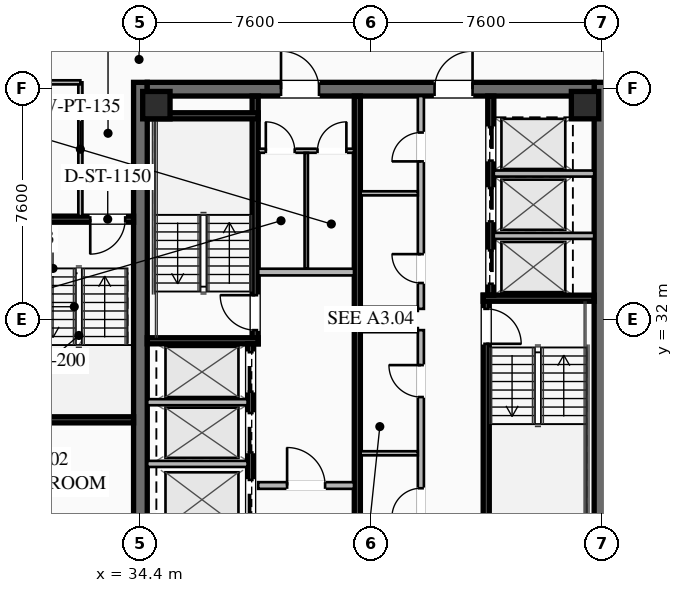
"""IFC4 building model, lengths in metres.
Left out: names, types, materials, properties, quantities, classifications, styles, units other than length and angle.
Written with IfcOpenShell. Run it as: python <this file> out.ifc"""

import sys

from ifc_helpers import new_model, si_unit, direction, frame, frame_2d, origin, origin_2d, place, context, subcontext, project, spatial, rectangle, hollow_rectangle, extrude, element, fill, save


model = new_model("IFC4")
c1 = context("Model", 3, precision=1e-05, world=origin(), true_north=direction((0.0, 1.0)))
c2 = subcontext(c1, "Body", "Model", "MODEL_VIEW")
j1 = project(units=[si_unit("LENGTHUNIT", "METRE"), si_unit("PLANEANGLEUNIT", "RADIAN")], contexts=[c1])
p1 = place(None, origin())
s1 = spatial("IfcSite", under=j1, at=p1, CompositionType="ELEMENT")
p2 = place(p1, origin())
s2 = spatial("IfcBuilding", under=s1, at=p2, CompositionType="ELEMENT")
p3 = place(p2, frame((0.0, 0.0, 211.3)))
s3 = spatial("IfcBuildingStorey", under=s2, at=p3, CompositionType="ELEMENT", Elevation=211.3)
for number, where, z_axis, x_axis in (
    (1, (34.425, 24.2, 0.0), (0.0, 0.0, 1.0), (0.0, 1.0, 0.0)),
    (2, (49.575, 39.8, 0.0), (0.0, 0.0, 1.0), (0.0, -1.0, 0.0)),
):
    element("IfcWall", number, at=place(p3, frame(where, z_axis=z_axis, x_axis=x_axis)), inside=s3, PredefinedType="SHEAR", context=c2, shape_type="SweptSolid", body=[
        extrude(rectangle(XDim=15.6, YDim=0.45, at=frame_2d((7.8, 0.0))), origin(), (0.0, 0.0, 1.0), 3.55),
    ])
p4 = place(p3, frame((34.65, 39.575, 0.0), z_axis=(0.0, 0.0, 1.0), x_axis=(1.0, 0.0, 0.0)))
e3 = element("IfcWall", 3, at=p4, inside=s3, PredefinedType="SHEAR", context=c2, shape_type="SweptSolid", body=[
    extrude(rectangle(XDim=14.7, YDim=0.45, at=frame_2d((7.35, 0.0))), origin(), (0.0, 0.0, 1.0), 3.55),
])
p5 = place(p4, frame((4.4, 0.0, 0.0)))
e4 = element("IfcOpeningElement", 4, at=p5, cuts=e3, PredefinedType="OPENING", context=c2, shape_type="SweptSolid", body=[
    extrude(rectangle(XDim=1.25, YDim=2.25, at=frame_2d((0.625, 1.125))), frame((0.0, 0.235, 0.0), z_axis=(0.0, -1.0, 0.0), x_axis=(1.0, 0.0, 0.0)), (0.0, 0.0, 1.0), 0.47),
])
p6 = place(p4, frame((9.45, 0.0, 0.0)))
e5 = element("IfcOpeningElement", 5, at=p6, cuts=e3, PredefinedType="OPENING", context=c2, shape_type="SweptSolid", body=[
    extrude(rectangle(XDim=1.25, YDim=2.25, at=frame_2d((0.625, 1.125))), frame((0.0, 0.235, 0.0), z_axis=(0.0, -1.0, 0.0), x_axis=(1.0, 0.0, 0.0)), (0.0, 0.0, 1.0), 0.47),
])
for number, where, z_axis, x_axis in (
    (6, (49.05, 39.05, 0.0), (0.0, 0.0, 1.0), (1.0, 0.0, 0.0)),
    (7, (34.95, 39.05, 0.0), (0.0, 0.0, 1.0), (1.0, 0.0, 0.0)),
):
    element("IfcColumn", number, at=place(p3, frame(where, z_axis=z_axis, x_axis=x_axis)), inside=s3, PredefinedType="COLUMN", context=c2, shape_type="SweptSolid", body=[
        extrude(hollow_rectangle(XDim=0.9, YDim=0.9, WallThickness=0.04, at=origin_2d()), origin(), (0.0, 0.0, 1.0), 3.37),
    ])
p7 = place(p3, frame((38.2, 31.2, 0.0), z_axis=(0.0, 0.0, 1.0), x_axis=(0.0, 1.0, 0.0)))
e8 = element("IfcWall", 8, at=p7, inside=s3, PredefinedType="SHEAR", context=c2, shape_type="SweptSolid", body=[
    extrude(rectangle(XDim=8.15, YDim=0.2, at=frame_2d((4.075, 0.0))), origin(), (0.0, 0.0, 1.0), 3.37),
])
p8 = place(p7, frame((0.45, 0.0, 0.0)))
e9 = element("IfcOpeningElement", 9, at=p8, cuts=e8, PredefinedType="OPENING", context=c2, shape_type="SweptSolid", body=[
    extrude(rectangle(XDim=1.15, YDim=2.2, at=frame_2d((0.575, 1.1))), frame((0.0, 0.11, 0.0), z_axis=(0.0, -1.0, 0.0), x_axis=(1.0, 0.0, 0.0)), (0.0, 0.0, 1.0), 0.22),
])
for number, where, z_axis, x_axis in (
    (10, (34.65, 31.3, 0.0), (0.0, 0.0, 1.0), (1.0, 0.0, 0.0)),
    (11, (34.65, 38.7, 0.0), (0.0, 0.0, 1.0), (1.0, 0.0, 0.0)),
):
    element("IfcWall", number, at=place(p3, frame(where, z_axis=z_axis, x_axis=x_axis)), inside=s3, PredefinedType="SHEAR", context=c2, shape_type="SweptSolid", body=[
        extrude(rectangle(XDim=3.65, YDim=0.2, at=frame_2d((1.825, 0.0))), origin(), (0.0, 0.0, 1.0), 3.37),
    ])
p9 = place(p3, frame((45.8, 32.8, 0.0), z_axis=(0.0, 0.0, 1.0), x_axis=(0.0, -1.0, 0.0)))
e12 = element("IfcWall", 12, at=p9, inside=s3, PredefinedType="SHEAR", context=c2, shape_type="SweptSolid", body=[
    extrude(rectangle(XDim=8.15, YDim=0.2, at=frame_2d((4.075, 0.0))), origin(), (0.0, 0.0, 1.0), 3.37),
])
p10 = place(p9, frame((0.45, 0.0, 0.0)))
e13 = element("IfcOpeningElement", 13, at=p10, cuts=e12, PredefinedType="OPENING", context=c2, shape_type="SweptSolid", body=[
    extrude(rectangle(XDim=1.15, YDim=2.2, at=frame_2d((0.575, 1.1))), frame((0.0, 0.11, 0.0), z_axis=(0.0, -1.0, 0.0), x_axis=(1.0, 0.0, 0.0)), (0.0, 0.0, 1.0), 0.22),
])
p11 = place(p3, frame((45.7, 32.7, 0.0), z_axis=(0.0, 0.0, 1.0), x_axis=(1.0, 0.0, 0.0)))
e14 = element("IfcWall", 14, at=p11, inside=s3, PredefinedType="SHEAR", context=c2, shape_type="SweptSolid", body=[
    extrude(rectangle(XDim=3.65, YDim=0.2, at=frame_2d((1.825, 0.0))), origin(), (0.0, 0.0, 1.0), 3.37),
])
p12 = place(p3, frame((41.56, 24.65, 0.0), z_axis=(0.0, 0.0, 1.0), x_axis=(0.0, 1.0, 0.0)))
e15 = element("IfcWall", 15, at=p12, inside=s3, PredefinedType="SHEAR", context=c2, shape_type="SweptSolid", body=[
    extrude(rectangle(XDim=14.7, YDim=0.2, at=frame_2d((7.35, 0.0))), origin(), (0.0, 0.0, 1.0), 3.37),
])
p13 = place(p3, frame((38.3, 33.56, 0.0), z_axis=(0.0, 0.0, 1.0), x_axis=(1.0, 0.0, 0.0)))
e16 = element("IfcWall", 16, at=p13, inside=s3, PredefinedType="SOLIDWALL", context=c2, shape_type="SweptSolid", body=[
    extrude(rectangle(XDim=3.15, YDim=0.22, at=frame_2d((1.575, 0.0))), origin(), (0.0, 0.0, 1.0), 2.723),
])
p14 = place(p3, frame((38.3, 26.54, 0.0), z_axis=(0.0, 0.0, 1.0), x_axis=(1.0, 0.0, 0.0)))
e17 = element("IfcWall", 17, at=p14, inside=s3, PredefinedType="SOLIDWALL", context=c2, shape_type="SweptSolid", body=[
    extrude(rectangle(XDim=3.15, YDim=0.22, at=frame_2d((1.575, 0.0))), origin(), (0.0, 0.0, 1.0), 2.723),
])
p15 = place(p14, frame((0.95, 0.0, 0.0)))
e18 = element("IfcOpeningElement", 18, at=p15, cuts=e17, PredefinedType="OPENING", context=c2, shape_type="SweptSolid", body=[
    extrude(rectangle(XDim=1.25, YDim=2.25, at=frame_2d((0.625, 1.125))), frame((0.0, 0.12, 0.0), z_axis=(0.0, -1.0, 0.0), x_axis=(1.0, 0.0, 0.0)), (0.0, 0.0, 1.0), 0.24),
])
p16 = place(p3, frame((38.05, 24.65, 0.0), z_axis=(0.0, 0.0, 1.0), x_axis=(0.0, 1.0, 0.0)))
e19 = element("IfcWall", 19, at=p16, inside=s3, PredefinedType="SHEAR", context=c2, shape_type="SweptSolid", body=[
    extrude(rectangle(XDim=6.55, YDim=0.2, at=frame_2d((3.275, 0.0))), origin(), (0.0, 0.0, 1.0), 3.37),
])
p17 = place(p16, frame((4.975, 0.0, 0.0)))
e20 = element("IfcOpeningElement", 20, at=p17, cuts=e19, PredefinedType="OPENING", context=c2, shape_type="SweptSolid", body=[
    extrude(rectangle(XDim=1.3, YDim=2.25, at=frame_2d((0.65, 1.125))), frame((0.0, 0.11, 0.0), z_axis=(0.0, -1.0, 0.0), x_axis=(1.0, 0.0, 0.0)), (0.0, 0.0, 1.0), 0.22),
])
p18 = place(p16, frame((2.975, 0.0, 0.0)))
e21 = element("IfcOpeningElement", 21, at=p18, cuts=e19, PredefinedType="OPENING", context=c2, shape_type="SweptSolid", body=[
    extrude(rectangle(XDim=1.3, YDim=2.25, at=frame_2d((0.65, 1.125))), frame((0.0, 0.11, 0.0), z_axis=(0.0, -1.0, 0.0), x_axis=(1.0, 0.0, 0.0)), (0.0, 0.0, 1.0), 0.22),
])
p19 = place(p16, frame((0.775, 0.0, 0.0)))
e22 = element("IfcOpeningElement", 22, at=p19, cuts=e19, PredefinedType="OPENING", context=c2, shape_type="SweptSolid", body=[
    extrude(rectangle(XDim=1.3, YDim=2.25, at=frame_2d((0.65, 1.125))), frame((0.0, 0.11, 0.0), z_axis=(0.0, -1.0, 0.0), x_axis=(1.0, 0.0, 0.0)), (0.0, 0.0, 1.0), 0.22),
])
for number, where, z_axis, x_axis in (
    (23, (34.65, 27.25, 0.0), (0.0, 0.0, 1.0), (1.0, 0.0, 0.0)),
    (24, (34.65, 29.28, 0.0), (0.0, 0.0, 1.0), (1.0, 0.0, 0.0)),
):
    element("IfcWall", number, at=place(p3, frame(where, z_axis=z_axis, x_axis=x_axis)), inside=s3, PredefinedType="SOLIDWALL", context=c2, shape_type="SweptSolid", body=[
        extrude(rectangle(XDim=3.3, YDim=0.2, at=frame_2d((1.65, 0.0))), origin(), (0.0, 0.0, 1.0), 3.37),
    ])
p20 = place(p3, frame((45.95, 39.35, 0.0), z_axis=(0.0, 0.0, 1.0), x_axis=(0.0, -1.0, 0.0)))
e25 = element("IfcWall", 25, at=p20, inside=s3, PredefinedType="SHEAR", context=c2, shape_type="SweptSolid", body=[
    extrude(rectangle(XDim=6.55, YDim=0.2, at=frame_2d((3.275, 0.0))), origin(), (0.0, 0.0, 1.0), 3.37),
])
p21 = place(p20, frame((5.075, 0.0, 0.0)))
e26 = element("IfcOpeningElement", 26, at=p21, cuts=e25, PredefinedType="OPENING", context=c2, shape_type="SweptSolid", body=[
    extrude(rectangle(XDim=1.1, YDim=2.2, at=frame_2d((0.55, 1.1))), frame((0.0, 0.11, 0.0), z_axis=(0.0, -1.0, 0.0), x_axis=(1.0, 0.0, 0.0)), (0.0, 0.0, 1.0), 0.22),
])
p22 = place(p20, frame((3.025, 0.0, 0.0)))
e27 = element("IfcOpeningElement", 27, at=p22, cuts=e25, PredefinedType="OPENING", context=c2, shape_type="SweptSolid", body=[
    extrude(rectangle(XDim=1.1, YDim=2.2, at=frame_2d((0.55, 1.1))), frame((0.0, 0.11, 0.0), z_axis=(0.0, -1.0, 0.0), x_axis=(1.0, 0.0, 0.0)), (0.0, 0.0, 1.0), 0.22),
])
p23 = place(p20, frame((1.025, 0.0, 0.0)))
e28 = element("IfcOpeningElement", 28, at=p23, cuts=e25, PredefinedType="OPENING", context=c2, shape_type="SweptSolid", body=[
    extrude(rectangle(XDim=1.1, YDim=2.2, at=frame_2d((0.55, 1.1))), frame((0.0, 0.11, 0.0), z_axis=(0.0, -1.0, 0.0), x_axis=(1.0, 0.0, 0.0)), (0.0, 0.0, 1.0), 0.22),
])
for number, where, z_axis, x_axis in (
    (29, (46.05, 34.75, 0.0), (0.0, 0.0, 1.0), (1.0, 0.0, 0.0)),
    (30, (46.05, 36.8, 0.0), (0.0, 0.0, 1.0), (1.0, 0.0, 0.0)),
):
    element("IfcWall", number, at=place(p3, frame(where, z_axis=z_axis, x_axis=x_axis)), inside=s3, PredefinedType="SOLIDWALL", context=c2, shape_type="SweptSolid", body=[
        extrude(rectangle(XDim=3.3, YDim=0.2, at=frame_2d((1.65, 0.0))), origin(), (0.0, 0.0, 1.0), 3.37),
    ])
p24 = place(p3, frame((38.3, 37.55, 0.0), z_axis=(0.0, 0.0, 1.0), x_axis=(1.0, 0.0, 0.0)))
e31 = element("IfcWall", 31, at=p24, inside=s3, PredefinedType="PARTITIONING", context=c2, shape_type="SweptSolid", body=[
    extrude(rectangle(XDim=3.15, YDim=0.135, at=frame_2d((1.575, 0.0))), origin(), (0.0, 0.0, 1.0), 2.723),
])
p25 = place(p24, frame((0.25, 0.0, 0.0)))
e32 = element("IfcOpeningElement", 32, at=p25, cuts=e31, PredefinedType="OPENING", context=c2, shape_type="SweptSolid", body=[
    extrude(rectangle(XDim=0.95, YDim=2.05, at=frame_2d((0.475, 1.025))), frame((0.0, 0.077, 0.0), z_axis=(0.0, -1.0, 0.0), x_axis=(1.0, 0.0, 0.0)), (0.0, 0.0, 1.0), 0.155),
])
p26 = place(p24, frame((1.95, 0.0, 0.0)))
e33 = element("IfcOpeningElement", 33, at=p26, cuts=e31, PredefinedType="OPENING", context=c2, shape_type="SweptSolid", body=[
    extrude(rectangle(XDim=0.95, YDim=2.05, at=frame_2d((0.475, 1.025))), frame((0.0, 0.077, 0.0), z_axis=(0.0, -1.0, 0.0), x_axis=(1.0, 0.0, 0.0)), (0.0, 0.0, 1.0), 0.155),
])
p27 = place(p3, frame((39.88, 33.68, 0.0), z_axis=(0.0, 0.0, 1.0), x_axis=(0.0, 1.0, 0.0)))
e34 = element("IfcWall", 34, at=p27, inside=s3, PredefinedType="PARTITIONING", context=c2, shape_type="SweptSolid", body=[
    extrude(rectangle(XDim=3.8, YDim=0.11, at=frame_2d((1.9, 0.0))), origin(), (0.0, 0.0, 1.0), 2.723),
])
p28 = place(p3, frame((43.65, 24.65, 0.0), z_axis=(0.0, 0.0, 1.0), x_axis=(0.0, 1.0, 0.0)))
e35 = element("IfcWall", 35, at=p28, inside=s3, PredefinedType="SOLIDWALL", context=c2, shape_type="SweptSolid", body=[
    extrude(rectangle(XDim=7.0, YDim=0.2, at=frame_2d((3.5, 0.0))), origin(), (0.0, 0.0, 1.0), 2.723),
])
p29 = place(p28, frame((0.85, 0.0, 0.0)))
e36 = element("IfcOpeningElement", 36, at=p29, cuts=e35, PredefinedType="OPENING", context=c2, shape_type="SweptSolid", body=[
    extrude(rectangle(XDim=0.95, YDim=2.05, at=frame_2d((0.475, 1.025))), frame((0.0, 0.11, 0.0), z_axis=(0.0, -1.0, 0.0), x_axis=(1.0, 0.0, 0.0)), (0.0, 0.0, 1.0), 0.22),
])
p30 = place(p28, frame((4.8, 0.0, 0.0)))
e37 = element("IfcOpeningElement", 37, at=p30, cuts=e35, PredefinedType="OPENING", context=c2, shape_type="SweptSolid", body=[
    extrude(rectangle(XDim=1.05, YDim=2.2, at=frame_2d((0.525, 1.1))), frame((0.0, 0.11, 0.0), z_axis=(0.0, -1.0, 0.0), x_axis=(1.0, 0.0, 0.0)), (0.0, 0.0, 1.0), 0.22),
])
for number, where, z_axis, x_axis in (
    (38, (41.67, 31.65, 0.0), (0.0, 0.0, 1.0), (1.0, 0.0, 0.0)),
    (39, (41.67, 27.6, 0.0), (0.0, 0.0, 1.0), (1.0, 0.0, 0.0)),
):
    element("IfcWall", number, at=place(p3, frame(where, z_axis=z_axis, x_axis=x_axis)), inside=s3, PredefinedType="PARTITIONING", context=c2, shape_type="SweptSolid", body=[
        extrude(rectangle(XDim=1.88, YDim=0.135, at=frame_2d((0.94, 0.0))), origin(), (0.0, 0.0, 1.0), 2.723),
    ])
p31 = place(p3, frame((43.65, 32.35, 0.0), z_axis=(0.0, 0.0, 1.0), x_axis=(0.0, 1.0, 0.0)))
e40 = element("IfcWall", 40, at=p31, inside=s3, PredefinedType="SOLIDWALL", context=c2, shape_type="SweptSolid", body=[
    extrude(rectangle(XDim=7.0, YDim=0.2, at=frame_2d((3.5, 0.0))), origin(), (0.0, 0.0, 1.0), 2.723),
])
p32 = place(p31, frame((0.85, 0.0, 0.0)))
e41 = element("IfcOpeningElement", 41, at=p32, cuts=e40, PredefinedType="OPENING", context=c2, shape_type="SweptSolid", body=[
    extrude(rectangle(XDim=0.95, YDim=2.05, at=frame_2d((0.475, 1.025))), frame((0.0, 0.11, 0.0), z_axis=(0.0, -1.0, 0.0), x_axis=(1.0, 0.0, 0.0)), (0.0, 0.0, 1.0), 0.22),
])
p33 = place(p31, frame((4.85, 0.0, 0.0)))
e42 = element("IfcOpeningElement", 42, at=p33, cuts=e40, PredefinedType="OPENING", context=c2, shape_type="SweptSolid", body=[
    extrude(rectangle(XDim=0.95, YDim=2.05, at=frame_2d((0.475, 1.025))), frame((0.0, 0.11, 0.0), z_axis=(0.0, -1.0, 0.0), x_axis=(1.0, 0.0, 0.0)), (0.0, 0.0, 1.0), 0.22),
])
for number, where, z_axis, x_axis in (
    (43, (41.67, 32.35, 0.0), (0.0, 0.0, 1.0), (1.0, 0.0, 0.0)),
    (44, (41.67, 36.15, 0.0), (0.0, 0.0, 1.0), (1.0, 0.0, 0.0)),
):
    element("IfcWall", number, at=place(p3, frame(where, z_axis=z_axis, x_axis=x_axis)), inside=s3, PredefinedType="PARTITIONING", context=c2, shape_type="SweptSolid", body=[
        extrude(rectangle(XDim=1.88, YDim=0.135, at=frame_2d((0.94, 0.0))), origin(), (0.0, 0.0, 1.0), 2.723),
    ])
p34 = place(p3, frame((34.2, 35.3, 0.0), z_axis=(0.0, 0.0, 1.0), x_axis=(-1.0, 0.0, 0.0)))
e45 = element("IfcWall", 45, at=p34, inside=s3, PredefinedType="SHEAR", context=c2, shape_type="SweptSolid", body=[
    extrude(rectangle(XDim=3.4, YDim=0.2, at=frame_2d((1.7, 0.0))), origin(), (0.0, 0.0, 1.0), 3.37),
])
p35 = place(p34, frame((0.275, 0.0, 0.0)))
e46 = element("IfcOpeningElement", 46, at=p35, cuts=e45, PredefinedType="OPENING", context=c2, shape_type="SweptSolid", body=[
    extrude(rectangle(XDim=1.15, YDim=2.2, at=frame_2d((0.575, 1.1))), frame((0.0, 0.11, 0.0), z_axis=(0.0, -1.0, 0.0), x_axis=(1.0, 0.0, 0.0)), (0.0, 0.0, 1.0), 0.22),
])
p36 = place(p3, frame((30.8, 28.7, 0.0), z_axis=(0.0, 0.0, 1.0), x_axis=(1.0, 0.0, 0.0)))
e47 = element("IfcWall", 47, at=p36, inside=s3, PredefinedType="SHEAR", context=c2, shape_type="SweptSolid", body=[
    extrude(rectangle(XDim=3.4, YDim=0.2, at=frame_2d((1.7, 0.0))), origin(), (0.0, 0.0, 1.0), 3.37),
])
p37 = place(p3, frame((32.45, 35.4, 0.0), z_axis=(0.0, 0.0, 1.0), x_axis=(0.0, 1.0, 0.0)))
e48 = element("IfcWall", 48, at=p37, inside=s3, PredefinedType="PARTITIONING", context=c2, shape_type="SweptSolid", body=[
    extrude(rectangle(XDim=4.4, YDim=0.135, at=frame_2d((2.2, 0.0))), origin(), (0.0, 0.0, 1.0), 2.723),
])
p38 = place(p3, frame((32.45, 39.8, 0.0), z_axis=(0.0, 0.0, 1.0), x_axis=(-1.0, 0.0, 0.0)))
e49 = element("IfcWall", 49, at=p38, inside=s3, PredefinedType="PARTITIONING", context=c2, shape_type="SweptSolid", body=[
    extrude(rectangle(XDim=6.73, YDim=0.135, at=frame_2d((3.365, 0.0))), origin(), (0.0, 0.0, 1.0), 2.723),
])
p39 = place(p38, frame((2.54, 0.0, 0.0)))
e50 = element("IfcOpeningElement", 50, at=p39, cuts=e49, PredefinedType="OPENING", context=c2, shape_type="SweptSolid", body=[
    extrude(rectangle(XDim=0.95, YDim=2.05, at=frame_2d((0.475, 1.025))), frame((0.0, 0.077, 0.0), z_axis=(0.0, -1.0, 0.0), x_axis=(1.0, 0.0, 0.0)), (0.0, 0.0, 1.0), 0.155),
])
p40 = place(p5, origin())
e51 = element("IfcDoor", 51, at=p40, inside=s3, OperationType="SINGLE_SWING_LEFT", PredefinedType="DOOR", context=c2, shape_type="SweptSolid", body=[
    extrude(rectangle(XDim=1.25, YDim=2.25, at=frame_2d((0.625, 1.125))), frame((0.0, 0.025, 0.0), z_axis=(0.0, -1.0, 0.0), x_axis=(1.0, 0.0, 0.0)), (0.0, 0.0, 1.0), 0.05),
])
fill(e4, e51)
p41 = place(p6, origin())
e52 = element("IfcDoor", 52, at=p41, inside=s3, OperationType="SINGLE_SWING_RIGHT", PredefinedType="DOOR", context=c2, shape_type="SweptSolid", body=[
    extrude(rectangle(XDim=1.25, YDim=2.25, at=frame_2d((0.625, 1.125))), frame((0.0, 0.025, 0.0), z_axis=(0.0, -1.0, 0.0), x_axis=(1.0, 0.0, 0.0)), (0.0, 0.0, 1.0), 0.05),
])
fill(e5, e52)
p42 = place(p8, origin())
e53 = element("IfcDoor", 53, at=p42, inside=s3, OperationType="SINGLE_SWING_RIGHT", PredefinedType="DOOR", context=c2, shape_type="SweptSolid", body=[
    extrude(rectangle(XDim=1.15, YDim=2.2, at=frame_2d((0.575, 1.1))), frame((0.0, 0.025, 0.0), z_axis=(0.0, -1.0, 0.0), x_axis=(1.0, 0.0, 0.0)), (0.0, 0.0, 1.0), 0.05),
])
fill(e9, e53)
p43 = place(p10, origin())
e54 = element("IfcDoor", 54, at=p43, inside=s3, OperationType="SINGLE_SWING_RIGHT", PredefinedType="DOOR", context=c2, shape_type="SweptSolid", body=[
    extrude(rectangle(XDim=1.15, YDim=2.2, at=frame_2d((0.575, 1.1))), frame((0.0, 0.025, 0.0), z_axis=(0.0, -1.0, 0.0), x_axis=(1.0, 0.0, 0.0)), (0.0, 0.0, 1.0), 0.05),
])
fill(e13, e54)
p44 = place(p15, origin())
e55 = element("IfcDoor", 55, at=p44, inside=s3, OperationType="SINGLE_SWING_LEFT", PredefinedType="DOOR", context=c2, shape_type="SweptSolid", body=[
    extrude(rectangle(XDim=1.25, YDim=2.25, at=frame_2d((0.625, 1.125))), frame((0.0, 0.025, 0.0), z_axis=(0.0, -1.0, 0.0), x_axis=(1.0, 0.0, 0.0)), (0.0, 0.0, 1.0), 0.05),
])
fill(e18, e55)
p45 = place(p25, origin())
e56 = element("IfcDoor", 56, at=p45, inside=s3, OperationType="SINGLE_SWING_LEFT", PredefinedType="DOOR", context=c2, shape_type="SweptSolid", body=[
    extrude(rectangle(XDim=0.95, YDim=2.05, at=frame_2d((0.475, 1.025))), frame((0.0, 0.025, 0.0), z_axis=(0.0, -1.0, 0.0), x_axis=(1.0, 0.0, 0.0)), (0.0, 0.0, 1.0), 0.05),
])
fill(e32, e56)
p46 = place(p26, origin())
e57 = element("IfcDoor", 57, at=p46, inside=s3, OperationType="SINGLE_SWING_RIGHT", PredefinedType="DOOR", context=c2, shape_type="SweptSolid", body=[
    extrude(rectangle(XDim=0.95, YDim=2.05, at=frame_2d((0.475, 1.025))), frame((0.0, 0.025, 0.0), z_axis=(0.0, -1.0, 0.0), x_axis=(1.0, 0.0, 0.0)), (0.0, 0.0, 1.0), 0.05),
])
fill(e33, e57)
p47 = place(p29, origin())
e58 = element("IfcDoor", 58, at=p47, inside=s3, OperationType="SINGLE_SWING_LEFT", PredefinedType="DOOR", context=c2, shape_type="SweptSolid", body=[
    extrude(rectangle(XDim=0.95, YDim=2.05, at=frame_2d((0.475, 1.025))), frame((0.0, 0.025, 0.0), z_axis=(0.0, -1.0, 0.0), x_axis=(1.0, 0.0, 0.0)), (0.0, 0.0, 1.0), 0.05),
])
fill(e36, e58)
p48 = place(p30, origin())
e59 = element("IfcDoor", 59, at=p48, inside=s3, OperationType="SINGLE_SWING_RIGHT", PredefinedType="DOOR", context=c2, shape_type="SweptSolid", body=[
    extrude(rectangle(XDim=1.05, YDim=2.2, at=frame_2d((0.525, 1.1))), frame((0.0, 0.025, 0.0), z_axis=(0.0, -1.0, 0.0), x_axis=(1.0, 0.0, 0.0)), (0.0, 0.0, 1.0), 0.05),
])
fill(e37, e59)
p49 = place(p32, origin())
e60 = element("IfcDoor", 60, at=p49, inside=s3, OperationType="SINGLE_SWING_RIGHT", PredefinedType="DOOR", context=c2, shape_type="SweptSolid", body=[
    extrude(rectangle(XDim=0.95, YDim=2.05, at=frame_2d((0.475, 1.025))), frame((0.0, 0.025, 0.0), z_axis=(0.0, -1.0, 0.0), x_axis=(1.0, 0.0, 0.0)), (0.0, 0.0, 1.0), 0.05),
])
fill(e41, e60)
p50 = place(p33, origin())
e61 = element("IfcDoor", 61, at=p50, inside=s3, OperationType="SINGLE_SWING_LEFT", PredefinedType="DOOR", context=c2, shape_type="SweptSolid", body=[
    extrude(rectangle(XDim=0.95, YDim=2.05, at=frame_2d((0.475, 1.025))), frame((0.0, 0.025, 0.0), z_axis=(0.0, -1.0, 0.0), x_axis=(1.0, 0.0, 0.0)), (0.0, 0.0, 1.0), 0.05),
])
fill(e42, e61)
p51 = place(p35, origin())
e62 = element("IfcDoor", 62, at=p51, inside=s3, OperationType="SINGLE_SWING_RIGHT", PredefinedType="DOOR", context=c2, shape_type="SweptSolid", body=[
    extrude(rectangle(XDim=1.15, YDim=2.2, at=frame_2d((0.575, 1.1))), frame((0.0, 0.025, 0.0), z_axis=(0.0, -1.0, 0.0), x_axis=(1.0, 0.0, 0.0)), (0.0, 0.0, 1.0), 0.05),
])
fill(e46, e62)
p52 = place(p17, origin())
e63 = element("IfcDoor", 63, at=p52, inside=s3, OperationType="SLIDING_TO_LEFT", PredefinedType="DOOR", context=c2, shape_type="SweptSolid", body=[
    extrude(rectangle(XDim=1.3, YDim=2.25, at=frame_2d((0.65, 1.125))), frame((0.0, 0.025, 0.0), z_axis=(0.0, -1.0, 0.0), x_axis=(1.0, 0.0, 0.0)), (0.0, 0.0, 1.0), 0.05),
])
fill(e20, e63)
p53 = place(p18, origin())
e64 = element("IfcDoor", 64, at=p53, inside=s3, OperationType="SLIDING_TO_LEFT", PredefinedType="DOOR", context=c2, shape_type="SweptSolid", body=[
    extrude(rectangle(XDim=1.3, YDim=2.25, at=frame_2d((0.65, 1.125))), frame((0.0, 0.025, 0.0), z_axis=(0.0, -1.0, 0.0), x_axis=(1.0, 0.0, 0.0)), (0.0, 0.0, 1.0), 0.05),
])
fill(e21, e64)
p54 = place(p19, origin())
e65 = element("IfcDoor", 65, at=p54, inside=s3, OperationType="SLIDING_TO_LEFT", PredefinedType="DOOR", context=c2, shape_type="SweptSolid", body=[
    extrude(rectangle(XDim=1.3, YDim=2.25, at=frame_2d((0.65, 1.125))), frame((0.0, 0.025, 0.0), z_axis=(0.0, -1.0, 0.0), x_axis=(1.0, 0.0, 0.0)), (0.0, 0.0, 1.0), 0.05),
])
fill(e22, e65)
p55 = place(p21, origin())
e66 = element("IfcDoor", 66, at=p55, inside=s3, OperationType="SLIDING_TO_LEFT", PredefinedType="DOOR", context=c2, shape_type="SweptSolid", body=[
    extrude(rectangle(XDim=1.1, YDim=2.2, at=frame_2d((0.55, 1.1))), frame((0.0, 0.025, 0.0), z_axis=(0.0, -1.0, 0.0), x_axis=(1.0, 0.0, 0.0)), (0.0, 0.0, 1.0), 0.05),
])
fill(e26, e66)
p56 = place(p22, origin())
e67 = element("IfcDoor", 67, at=p56, inside=s3, OperationType="SLIDING_TO_LEFT", PredefinedType="DOOR", context=c2, shape_type="SweptSolid", body=[
    extrude(rectangle(XDim=1.1, YDim=2.2, at=frame_2d((0.55, 1.1))), frame((0.0, 0.025, 0.0), z_axis=(0.0, -1.0, 0.0), x_axis=(1.0, 0.0, 0.0)), (0.0, 0.0, 1.0), 0.05),
])
fill(e27, e67)
p57 = place(p23, origin())
e68 = element("IfcDoor", 68, at=p57, inside=s3, OperationType="SLIDING_TO_LEFT", PredefinedType="DOOR", context=c2, shape_type="SweptSolid", body=[
    extrude(rectangle(XDim=1.1, YDim=2.2, at=frame_2d((0.55, 1.1))), frame((0.0, 0.025, 0.0), z_axis=(0.0, -1.0, 0.0), x_axis=(1.0, 0.0, 0.0)), (0.0, 0.0, 1.0), 0.05),
])
fill(e28, e68)
save(model, sys.argv[1])
